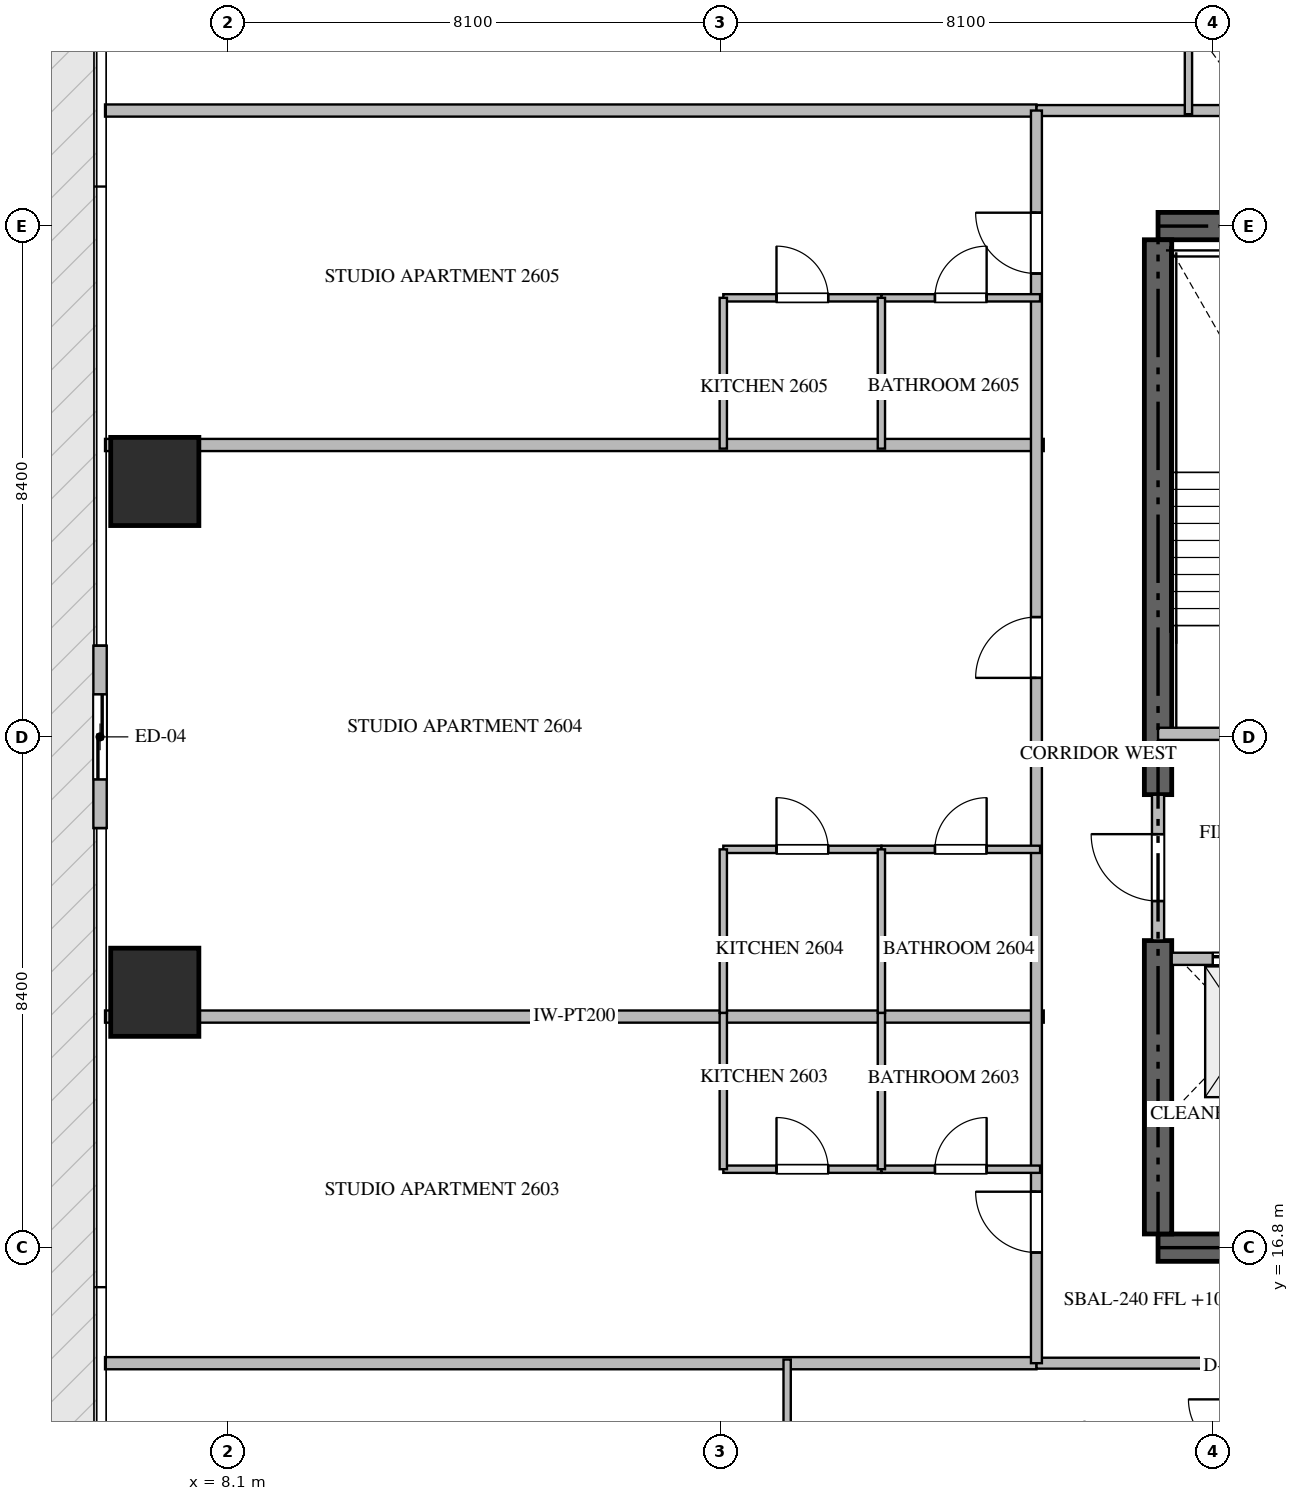
"""IFC4 building model, lengths in metres.
Left out: names, types, materials, properties, quantities, classifications, styles, units other than length and angle.
Written with IfcOpenShell. Run it as: python <this file> out.ifc"""

import sys

from ifc_helpers import new_model, si_unit, direction, frame, frame_2d, origin, origin_2d, place, context, subcontext, project, spatial, rectangle, extrude, source, transform, mapped, element, fill, save


model = new_model("IFC4")
c1 = context("Model", 3, precision=1e-05, world=origin(), true_north=direction((0.0, 1.0)))
c2 = subcontext(c1, "Body", "Model", "MODEL_VIEW")
j1 = project(units=[si_unit("LENGTHUNIT", "METRE"), si_unit("PLANEANGLEUNIT", "RADIAN")], contexts=[c1])
p1 = place(None, origin())
s1 = spatial("IfcSite", under=j1, at=p1, CompositionType="ELEMENT")
p2 = place(p1, origin())
s2 = spatial("IfcBuilding", under=s1, at=p2, CompositionType="ELEMENT")
p3 = place(p2, frame((0.0, 0.0, 105.45)))
s3 = spatial("IfcBuildingStorey", under=s2, at=p3, CompositionType="ELEMENT", Elevation=105.45)
for number, where, z_axis, x_axis in (
    (1, (23.4, 16.8, -0.26), (0.0, 0.0, 1.0), (1.0, 0.0, 0.0)),
    (2, (41.4, 33.6, -0.26), (0.0, 0.0, 1.0), (-1.0, 0.0, 0.0)),
):
    element("IfcWall", number, at=place(p3, frame(where, z_axis=z_axis, x_axis=x_axis)), inside=s3, PredefinedType="SHEAR", context=c2, shape_type="SweptSolid", body=[
        extrude(rectangle(XDim=18.0, YDim=0.45, at=frame_2d((9.0, 0.0))), origin(), (0.0, 0.0, 1.0), 3.648),
    ])
p4 = place(p3, frame((23.4, 17.025, -0.26), z_axis=(0.0, 0.0, 1.0), x_axis=(0.0, 1.0, 0.0)))
e3 = element("IfcWall", 3, at=p4, inside=s3, PredefinedType="SHEAR", context=c2, shape_type="SweptSolid", body=[
    extrude(rectangle(XDim=4.825, YDim=0.45, at=frame_2d((2.413, 0.0))), origin(), (0.0, 0.0, 1.0), 3.648),
])
p5 = place(p3, frame((23.4, 24.25, -0.26), z_axis=(0.0, 0.0, 1.0), x_axis=(0.0, 1.0, 0.0)))
e4 = element("IfcWall", 4, at=p5, inside=s3, PredefinedType="SHEAR", context=c2, shape_type="SweptSolid", body=[
    extrude(rectangle(XDim=9.125, YDim=0.45, at=frame_2d((4.562, 0.0))), origin(), (0.0, 0.0, 1.0), 3.648),
])
m1 = source(origin(), c2, "Body", "SweptSolid", [
    extrude(rectangle(XDim=1.45, YDim=1.45, at=origin_2d()), origin(), (0.0, 0.0, 1.0), 3.65),
])
for number, where, z_axis, x_axis in (
    (5, (6.9, 21.0, -0.26), (0.0, 0.0, 1.0), (1.0, 0.0, 0.0)),
    (6, (6.9, 29.4, -0.26), (0.0, 0.0, 1.0), (1.0, 0.0, 0.0)),
):
    element("IfcColumn", number, at=place(p3, frame(where, z_axis=z_axis, x_axis=x_axis)), inside=s3, PredefinedType="COLUMN", context=c2, shape_type="MappedRepresentation", body=[
        mapped(m1, transform((0.0, 0.0, 0.0), scale=1.0)),
    ])
p6 = place(p3, frame((6.0, 26.7, 0.0), z_axis=(0.0, 0.0, 1.0), x_axis=(0.0, -1.0, 0.0)))
e7 = element("IfcWall", 7, at=p6, inside=s3, PredefinedType="ELEMENTEDWALL", context=c2, shape_type="SweptSolid", body=[
    extrude(rectangle(XDim=3.0, YDim=0.22, at=frame_2d((1.5, 0.0))), origin(), (0.0, 0.0, 1.0), 3.375),
])
p7 = place(p6, frame((0.8, 0.0, 0.0)))
e8 = element("IfcOpeningElement", 8, at=p7, cuts=e7, PredefinedType="OPENING", context=c2, shape_type="SweptSolid", body=[
    extrude(rectangle(XDim=1.4, YDim=2.25, at=frame_2d((0.7, 1.125))), frame((0.0, 0.12, 0.0), z_axis=(0.0, -1.0, 0.0), x_axis=(1.0, 0.0, 0.0)), (0.0, 0.0, 1.0), 0.24),
])
p8 = place(p3, frame((23.4, 25.25, 0.0), z_axis=(0.0, 0.0, 1.0), x_axis=(1.0, 0.0, 0.0)))
e9 = element("IfcWall", 9, at=p8, inside=s3, PredefinedType="STANDARD", context=c2, shape_type="SweptSolid", body=[
    extrude(rectangle(XDim=4.45, YDim=0.2, at=frame_2d((2.225, 0.0))), origin(), (0.0, 0.0, 1.0), 3.39),
])
p9 = place(p8, frame((1.65, 0.0, 0.0)))
e10 = element("IfcOpeningElement", 10, at=p9, cuts=e9, PredefinedType="OPENING", context=c2, shape_type="SweptSolid", body=[
    extrude(rectangle(XDim=1.1, YDim=2.15, at=frame_2d((0.55, 1.075))), frame((0.0, 0.11, 0.0), z_axis=(0.0, -1.0, 0.0), x_axis=(1.0, 0.0, 0.0)), (0.0, 0.0, 1.0), 0.22),
])
p10 = place(p3, frame((23.625, 21.55, 0.0), z_axis=(0.0, 0.0, 1.0), x_axis=(1.0, 0.0, 0.0)))
e11 = element("IfcWall", 11, at=p10, inside=s3, PredefinedType="STANDARD", context=c2, shape_type="SweptSolid", body=[
    extrude(rectangle(XDim=2.425, YDim=0.2, at=frame_2d((1.212, 0.0))), origin(), (0.0, 0.0, 1.0), 3.39),
])
p11 = place(p10, frame((0.675, 0.0, 0.0)))
e12 = element("IfcOpeningElement", 12, at=p11, cuts=e11, PredefinedType="OPENING", context=c2, shape_type="SweptSolid", body=[
    extrude(rectangle(XDim=1.2, YDim=2.2, at=frame_2d((0.6, 1.1))), frame((0.0, 0.11, 0.0), z_axis=(0.0, -1.0, 0.0), x_axis=(1.0, 0.0, 0.0)), (0.0, 0.0, 1.0), 0.22),
])
p12 = place(p3, frame((23.625, 19.05, 0.0), z_axis=(0.0, 0.0, 1.0), x_axis=(1.0, 0.0, 0.0)))
e13 = element("IfcWall", 13, at=p12, inside=s3, PredefinedType="STANDARD", context=c2, shape_type="SweptSolid", body=[
    extrude(rectangle(XDim=2.425, YDim=0.2, at=frame_2d((1.212, 0.0))), origin(), (0.0, 0.0, 1.0), 3.39),
])
p13 = place(p3, frame((23.4, 21.852, 0.0), z_axis=(0.0, 0.0, 1.0), x_axis=(0.0, 1.0, 0.0)))
e14 = element("IfcWall", 14, at=p13, inside=s3, PredefinedType="STANDARD", context=c2, shape_type="SweptSolid", body=[
    extrude(rectangle(XDim=2.396, YDim=0.2, at=frame_2d((1.198, 0.0))), origin(), (0.0, 0.0, 1.0), 3.39),
])
p14 = place(p13, frame((0.648, 0.0, 0.0)))
e15 = element("IfcOpeningElement", 15, at=p14, cuts=e14, PredefinedType="OPENING", context=c2, shape_type="SweptSolid", body=[
    extrude(rectangle(XDim=1.1, YDim=2.15, at=frame_2d((0.55, 1.075))), frame((0.0, 0.11, 0.0), z_axis=(0.0, -1.0, 0.0), x_axis=(1.0, 0.0, 0.0)), (0.0, 0.0, 1.0), 0.22),
])
for number, where, z_axis, x_axis in (
    (16, (6.082, 20.6, 0.0), (0.0, 0.0, 1.0), (1.0, 0.0, 0.0)),
    (17, (6.082, 30.0, 0.0), (0.0, 0.0, 1.0), (1.0, 0.0, 0.0)),
):
    element("IfcWall", number, at=place(p3, frame(where, z_axis=z_axis, x_axis=x_axis)), inside=s3, PredefinedType="PARTITIONING", context=c2, shape_type="SweptSolid", body=[
        extrude(rectangle(XDim=15.438, YDim=0.2, at=frame_2d((7.719, 0.0))), origin(), (0.0, 0.0, 1.0), 3.39),
    ])
for number, where, z_axis, x_axis in (
    (18, (6.082, 14.9, 0.0), (0.0, 0.0, 1.0), (1.0, 0.0, 0.0)),
    (19, (6.082, 35.5, 0.0), (0.0, 0.0, 1.0), (1.0, 0.0, 0.0)),
):
    element("IfcWall", number, at=place(p3, frame(where, z_axis=z_axis, x_axis=x_axis)), inside=s3, PredefinedType="PARTITIONING", context=c2, shape_type="SweptSolid", body=[
        extrude(rectangle(XDim=15.318, YDim=0.2, at=frame_2d((7.659, 0.0))), origin(), (0.0, 0.0, 1.0), 3.39),
    ])
p15 = place(p3, frame((21.402, 14.9, 0.0), z_axis=(0.0, 0.0, 1.0), x_axis=(1.0, 0.0, 0.0)))
e20 = element("IfcWall", 20, at=p15, inside=s3, PredefinedType="PARTITIONING", context=c2, shape_type="SweptSolid", body=[
    extrude(rectangle(XDim=21.996, YDim=0.18, at=frame_2d((10.998, 0.0))), origin(), (0.0, 0.0, 1.0), 3.39),
])
p16 = place(p15, frame((7.202, 0.0, 0.0)))
e21 = element("IfcOpeningElement", 21, at=p16, cuts=e20, PredefinedType="OPENING", context=c2, shape_type="SweptSolid", body=[
    extrude(rectangle(XDim=1.0, YDim=2.15, at=frame_2d((0.5, 1.075))), frame((0.0, 0.1, 0.0), z_axis=(0.0, -1.0, 0.0), x_axis=(1.0, 0.0, 0.0)), (0.0, 0.0, 1.0), 0.2),
])
p17 = place(p3, frame((21.402, 35.5, 0.0), z_axis=(0.0, 0.0, 1.0), x_axis=(1.0, 0.0, 0.0)))
e22 = element("IfcWall", 22, at=p17, inside=s3, PredefinedType="PARTITIONING", context=c2, shape_type="SweptSolid", body=[
    extrude(rectangle(XDim=21.996, YDim=0.18, at=frame_2d((10.998, 0.0))), origin(), (0.0, 0.0, 1.0), 3.39),
])
p18 = place(p17, frame((15.222, 0.0, 0.0)))
e23 = element("IfcOpeningElement", 23, at=p18, cuts=e22, PredefinedType="OPENING", context=c2, shape_type="SweptSolid", body=[
    extrude(rectangle(XDim=1.0, YDim=2.15, at=frame_2d((0.5, 1.075))), frame((0.0, 0.1, 0.0), z_axis=(0.0, -1.0, 0.0), x_axis=(1.0, 0.0, 0.0)), (0.0, 0.0, 1.0), 0.2),
])
p19 = place(p3, frame((21.4, 14.9, 0.0), z_axis=(0.0, 0.0, 1.0), x_axis=(0.0, 1.0, 0.0)))
e24 = element("IfcWall", 24, at=p19, inside=s3, PredefinedType="PARTITIONING", context=c2, shape_type="SweptSolid", body=[
    extrude(rectangle(XDim=20.6, YDim=0.18, at=frame_2d((10.3, 0.0))), origin(), (0.0, 0.0, 1.0), 3.39),
])
p20 = place(p19, frame((1.82, 0.0, 0.0)))
e25 = element("IfcOpeningElement", 25, at=p20, cuts=e24, PredefinedType="OPENING", context=c2, shape_type="SweptSolid", body=[
    extrude(rectangle(XDim=1.0, YDim=2.15, at=frame_2d((0.5, 1.075))), frame((0.0, 0.1, 0.0), z_axis=(0.0, -1.0, 0.0), x_axis=(1.0, 0.0, 0.0)), (0.0, 0.0, 1.0), 0.2),
])
p21 = place(p19, frame((11.27, 0.0, 0.0)))
e26 = element("IfcOpeningElement", 26, at=p21, cuts=e24, PredefinedType="OPENING", context=c2, shape_type="SweptSolid", body=[
    extrude(rectangle(XDim=1.0, YDim=2.15, at=frame_2d((0.5, 1.075))), frame((0.0, 0.1, 0.0), z_axis=(0.0, -1.0, 0.0), x_axis=(1.0, 0.0, 0.0)), (0.0, 0.0, 1.0), 0.2),
])
p22 = place(p19, frame((17.92, 0.0, 0.0)))
e27 = element("IfcOpeningElement", 27, at=p22, cuts=e24, PredefinedType="OPENING", context=c2, shape_type="SweptSolid", body=[
    extrude(rectangle(XDim=1.0, YDim=2.15, at=frame_2d((0.5, 1.075))), frame((0.0, 0.1, 0.0), z_axis=(0.0, -1.0, 0.0), x_axis=(1.0, 0.0, 0.0)), (0.0, 0.0, 1.0), 0.2),
])
for number, where, z_axis, x_axis in (
    (28, (17.3, 12.752, 0.0), (0.0, 0.0, 1.0), (0.0, 1.0, 0.0)),
    (29, (23.9, 37.648, 0.0), (0.0, 0.0, 1.0), (0.0, -1.0, 0.0)),
):
    element("IfcWall", number, at=place(p3, frame(where, z_axis=z_axis, x_axis=x_axis)), inside=s3, PredefinedType="PARTITIONING", context=c2, shape_type="SweptSolid", body=[
        extrude(rectangle(XDim=2.208, YDim=0.12, at=frame_2d((1.104, 0.0))), origin(), (0.0, 0.0, 1.0), 3.39),
    ])
p23 = place(p3, frame((16.25, 18.09, 0.0), z_axis=(0.0, 0.0, 1.0), x_axis=(1.0, 0.0, 0.0)))
e30 = element("IfcWall", 30, at=p23, inside=s3, PredefinedType="PARTITIONING", context=c2, shape_type="SweptSolid", body=[
    extrude(rectangle(XDim=2.6, YDim=0.12, at=frame_2d((1.3, 0.0))), origin(), (0.0, 0.0, 1.0), 3.39),
])
p24 = place(p23, frame((0.875, 0.0, 0.0)))
e31 = element("IfcOpeningElement", 31, at=p24, cuts=e30, PredefinedType="OPENING", context=c2, shape_type="SweptSolid", body=[
    extrude(rectangle(XDim=0.85, YDim=2.1, at=frame_2d((0.425, 1.05))), frame((0.0, 0.07, 0.0), z_axis=(0.0, -1.0, 0.0), x_axis=(1.0, 0.0, 0.0)), (0.0, 0.0, 1.0), 0.14),
])
p25 = place(p3, frame((18.852, 18.09, 0.0), z_axis=(0.0, 0.0, 1.0), x_axis=(1.0, 0.0, 0.0)))
e32 = element("IfcWall", 32, at=p25, inside=s3, PredefinedType="PARTITIONING", context=c2, shape_type="SweptSolid", body=[
    extrude(rectangle(XDim=2.608, YDim=0.12, at=frame_2d((1.304, 0.0))), origin(), (0.0, 0.0, 1.0), 3.39),
])
p26 = place(p25, frame((0.879, 0.0, 0.0)))
e33 = element("IfcOpeningElement", 33, at=p26, cuts=e32, PredefinedType="OPENING", context=c2, shape_type="SweptSolid", body=[
    extrude(rectangle(XDim=0.85, YDim=2.1, at=frame_2d((0.425, 1.05))), frame((0.0, 0.07, 0.0), z_axis=(0.0, -1.0, 0.0), x_axis=(1.0, 0.0, 0.0)), (0.0, 0.0, 1.0), 0.14),
])
for number, where, z_axis, x_axis in (
    (34, (18.85, 18.09, 0.0), (0.0, 0.0, 1.0), (0.0, 1.0, 0.0)),
    (35, (16.25, 18.09, 0.0), (0.0, 0.0, 1.0), (0.0, 1.0, 0.0)),
):
    element("IfcWall", number, at=place(p3, frame(where, z_axis=z_axis, x_axis=x_axis)), inside=s3, PredefinedType="PARTITIONING", context=c2, shape_type="SweptSolid", body=[
        extrude(rectangle(XDim=2.57, YDim=0.12, at=frame_2d((1.285, 0.0))), origin(), (0.0, 0.0, 1.0), 3.39),
    ])
p27 = place(p3, frame((16.25, 23.35, 0.0), z_axis=(0.0, 0.0, 1.0), x_axis=(1.0, 0.0, 0.0)))
e36 = element("IfcWall", 36, at=p27, inside=s3, PredefinedType="PARTITIONING", context=c2, shape_type="SweptSolid", body=[
    extrude(rectangle(XDim=2.6, YDim=0.12, at=frame_2d((1.3, 0.0))), origin(), (0.0, 0.0, 1.0), 3.39),
])
p28 = place(p27, frame((0.875, 0.0, 0.0)))
e37 = element("IfcOpeningElement", 37, at=p28, cuts=e36, PredefinedType="OPENING", context=c2, shape_type="SweptSolid", body=[
    extrude(rectangle(XDim=0.85, YDim=2.1, at=frame_2d((0.425, 1.05))), frame((0.0, 0.07, 0.0), z_axis=(0.0, -1.0, 0.0), x_axis=(1.0, 0.0, 0.0)), (0.0, 0.0, 1.0), 0.14),
])
p29 = place(p3, frame((18.852, 23.35, 0.0), z_axis=(0.0, 0.0, 1.0), x_axis=(1.0, 0.0, 0.0)))
e38 = element("IfcWall", 38, at=p29, inside=s3, PredefinedType="PARTITIONING", context=c2, shape_type="SweptSolid", body=[
    extrude(rectangle(XDim=2.608, YDim=0.12, at=frame_2d((1.304, 0.0))), origin(), (0.0, 0.0, 1.0), 3.39),
])
p30 = place(p29, frame((0.879, 0.0, 0.0)))
e39 = element("IfcOpeningElement", 39, at=p30, cuts=e38, PredefinedType="OPENING", context=c2, shape_type="SweptSolid", body=[
    extrude(rectangle(XDim=0.85, YDim=2.1, at=frame_2d((0.425, 1.05))), frame((0.0, 0.07, 0.0), z_axis=(0.0, -1.0, 0.0), x_axis=(1.0, 0.0, 0.0)), (0.0, 0.0, 1.0), 0.14),
])
for number, where, z_axis, x_axis in (
    (40, (18.85, 20.662, 0.0), (0.0, 0.0, 1.0), (0.0, 1.0, 0.0)),
    (41, (16.25, 20.662, 0.0), (0.0, 0.0, 1.0), (0.0, 1.0, 0.0)),
):
    element("IfcWall", number, at=place(p3, frame(where, z_axis=z_axis, x_axis=x_axis)), inside=s3, PredefinedType="PARTITIONING", context=c2, shape_type="SweptSolid", body=[
        extrude(rectangle(XDim=2.688, YDim=0.12, at=frame_2d((1.344, 0.0))), origin(), (0.0, 0.0, 1.0), 3.39),
    ])
p31 = place(p3, frame((16.25, 32.42, 0.0), z_axis=(0.0, 0.0, 1.0), x_axis=(1.0, 0.0, 0.0)))
e42 = element("IfcWall", 42, at=p31, inside=s3, PredefinedType="PARTITIONING", context=c2, shape_type="SweptSolid", body=[
    extrude(rectangle(XDim=2.6, YDim=0.12, at=frame_2d((1.3, 0.0))), origin(), (0.0, 0.0, 1.0), 3.39),
])
p32 = place(p31, frame((0.875, 0.0, 0.0)))
e43 = element("IfcOpeningElement", 43, at=p32, cuts=e42, PredefinedType="OPENING", context=c2, shape_type="SweptSolid", body=[
    extrude(rectangle(XDim=0.85, YDim=2.1, at=frame_2d((0.425, 1.05))), frame((0.0, 0.07, 0.0), z_axis=(0.0, -1.0, 0.0), x_axis=(1.0, 0.0, 0.0)), (0.0, 0.0, 1.0), 0.14),
])
p33 = place(p3, frame((18.852, 32.42, 0.0), z_axis=(0.0, 0.0, 1.0), x_axis=(1.0, 0.0, 0.0)))
e44 = element("IfcWall", 44, at=p33, inside=s3, PredefinedType="PARTITIONING", context=c2, shape_type="SweptSolid", body=[
    extrude(rectangle(XDim=2.608, YDim=0.12, at=frame_2d((1.304, 0.0))), origin(), (0.0, 0.0, 1.0), 3.39),
])
p34 = place(p33, frame((0.879, 0.0, 0.0)))
e45 = element("IfcOpeningElement", 45, at=p34, cuts=e44, PredefinedType="OPENING", context=c2, shape_type="SweptSolid", body=[
    extrude(rectangle(XDim=0.85, YDim=2.1, at=frame_2d((0.425, 1.05))), frame((0.0, 0.07, 0.0), z_axis=(0.0, -1.0, 0.0), x_axis=(1.0, 0.0, 0.0)), (0.0, 0.0, 1.0), 0.14),
])
for number, where, z_axis, x_axis in (
    (46, (18.85, 29.94, 0.0), (0.0, 0.0, 1.0), (0.0, 1.0, 0.0)),
    (47, (16.25, 29.94, 0.0), (0.0, 0.0, 1.0), (0.0, 1.0, 0.0)),
):
    element("IfcWall", number, at=place(p3, frame(where, z_axis=z_axis, x_axis=x_axis)), inside=s3, PredefinedType="PARTITIONING", context=c2, shape_type="SweptSolid", body=[
        extrude(rectangle(XDim=2.48, YDim=0.12, at=frame_2d((1.24, 0.0))), origin(), (0.0, 0.0, 1.0), 3.39),
    ])
m2 = source(origin(), c2, "Body", "SweptSolid", [
    extrude(rectangle(XDim=1.4, YDim=2.25, at=frame_2d((0.7, 1.125))), frame((0.0, 0.025, 0.0), z_axis=(0.0, -1.0, 0.0), x_axis=(1.0, 0.0, 0.0)), (0.0, 0.0, 1.0), 0.05),
])
p35 = place(p7, origin())
e48 = element("IfcDoor", 48, at=p35, inside=s3, OperationType="SLIDING_TO_LEFT", PredefinedType="DOOR", context=c2, shape_type="MappedRepresentation", body=[
    mapped(m2, transform((0.0, 0.0, 0.0), scale=1.0)),
])
fill(e8, e48)
m3 = source(origin(), c2, "Body", "SweptSolid", [
    extrude(rectangle(XDim=1.2, YDim=2.2, at=frame_2d((0.6, 1.1))), frame((0.0, 0.025, 0.0), z_axis=(0.0, -1.0, 0.0), x_axis=(1.0, 0.0, 0.0)), (0.0, 0.0, 1.0), 0.05),
])
p36 = place(p11, origin())
e49 = element("IfcDoor", 49, at=p36, inside=s3, OperationType="DOUBLE_DOOR_SLIDING", PredefinedType="DOOR", context=c2, shape_type="MappedRepresentation", body=[
    mapped(m3, transform((0.0, 0.0, 0.0), scale=1.0)),
])
fill(e12, e49)
m4 = source(origin(), c2, "Body", "SweptSolid", [
    extrude(rectangle(XDim=1.1, YDim=2.15, at=frame_2d((0.55, 1.075))), frame((0.0, 0.025, 0.0), z_axis=(0.0, -1.0, 0.0), x_axis=(1.0, 0.0, 0.0)), (0.0, 0.0, 1.0), 0.05),
])
p37 = place(p14, origin())
e50 = element("IfcDoor", 50, at=p37, inside=s3, OperationType="SINGLE_SWING_RIGHT", PredefinedType="DOOR", context=c2, shape_type="MappedRepresentation", body=[
    mapped(m4, transform((0.0, 0.0, 0.0), scale=1.0)),
])
fill(e15, e50)
m5 = source(origin(), c2, "Body", "SweptSolid", [
    extrude(rectangle(XDim=1.0, YDim=2.15, at=frame_2d((0.5, 1.075))), frame((0.0, 0.025, 0.0), z_axis=(0.0, -1.0, 0.0), x_axis=(1.0, 0.0, 0.0)), (0.0, 0.0, 1.0), 0.05),
])
p38 = place(p20, origin())
e51 = element("IfcDoor", 51, at=p38, inside=s3, OperationType="SINGLE_SWING_RIGHT", PredefinedType="DOOR", context=c2, shape_type="MappedRepresentation", body=[
    mapped(m5, transform((0.0, 0.0, 0.0), scale=1.0)),
])
fill(e25, e51)
p39 = place(p21, origin())
e52 = element("IfcDoor", 52, at=p39, inside=s3, OperationType="SINGLE_SWING_LEFT", PredefinedType="DOOR", context=c2, shape_type="MappedRepresentation", body=[
    mapped(m5, transform((0.0, 0.0, 0.0), scale=1.0)),
])
fill(e26, e52)
p40 = place(p22, origin())
e53 = element("IfcDoor", 53, at=p40, inside=s3, OperationType="SINGLE_SWING_RIGHT", PredefinedType="DOOR", context=c2, shape_type="MappedRepresentation", body=[
    mapped(m5, transform((0.0, 0.0, 0.0), scale=1.0)),
])
fill(e27, e53)
m6 = source(origin(), c2, "Body", "SweptSolid", [
    extrude(rectangle(XDim=0.85, YDim=2.1, at=frame_2d((0.425, 1.05))), frame((0.0, 0.025, 0.0), z_axis=(0.0, -1.0, 0.0), x_axis=(1.0, 0.0, 0.0)), (0.0, 0.0, 1.0), 0.05),
])
p41 = place(p24, origin())
e54 = element("IfcDoor", 54, at=p41, inside=s3, OperationType="SINGLE_SWING_LEFT", PredefinedType="DOOR", context=c2, shape_type="MappedRepresentation", body=[
    mapped(m6, transform((0.0, 0.0, 0.0), scale=1.0)),
])
fill(e31, e54)
p42 = place(p26, origin())
e55 = element("IfcDoor", 55, at=p42, inside=s3, OperationType="SINGLE_SWING_RIGHT", PredefinedType="DOOR", context=c2, shape_type="MappedRepresentation", body=[
    mapped(m6, transform((0.0, 0.0, 0.0), scale=1.0)),
])
fill(e33, e55)
p43 = place(p28, origin())
e56 = element("IfcDoor", 56, at=p43, inside=s3, OperationType="SINGLE_SWING_LEFT", PredefinedType="DOOR", context=c2, shape_type="MappedRepresentation", body=[
    mapped(m6, transform((0.0, 0.0, 0.0), scale=1.0)),
])
fill(e37, e56)
p44 = place(p30, origin())
e57 = element("IfcDoor", 57, at=p44, inside=s3, OperationType="SINGLE_SWING_RIGHT", PredefinedType="DOOR", context=c2, shape_type="MappedRepresentation", body=[
    mapped(m6, transform((0.0, 0.0, 0.0), scale=1.0)),
])
fill(e39, e57)
p45 = place(p32, origin())
e58 = element("IfcDoor", 58, at=p45, inside=s3, OperationType="SINGLE_SWING_LEFT", PredefinedType="DOOR", context=c2, shape_type="MappedRepresentation", body=[
    mapped(m6, transform((0.0, 0.0, 0.0), scale=1.0)),
])
fill(e43, e58)
p46 = place(p34, origin())
e59 = element("IfcDoor", 59, at=p46, inside=s3, OperationType="SINGLE_SWING_RIGHT", PredefinedType="DOOR", context=c2, shape_type="MappedRepresentation", body=[
    mapped(m6, transform((0.0, 0.0, 0.0), scale=1.0)),
])
fill(e45, e59)
save(model, sys.argv[1])
